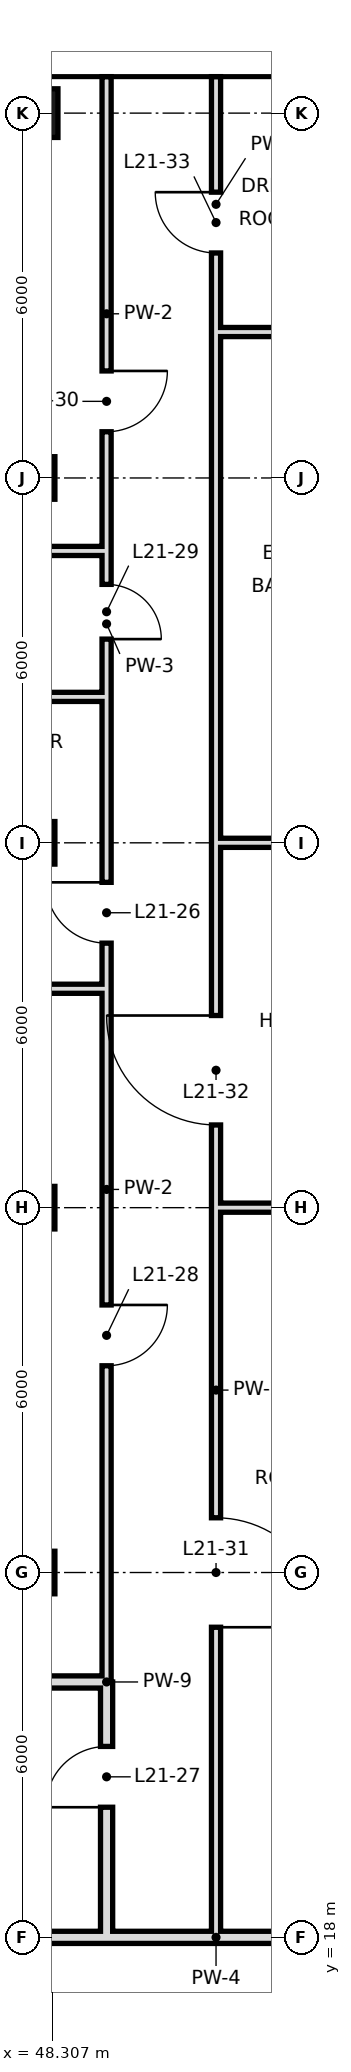
"""IFC4 building model, lengths in metres.
Left out: names, types, materials, properties, quantities, classifications, styles, units other than length and angle.
Written with IfcOpenShell. Run it as: python <this file> out.ifc"""

import sys

from ifc_helpers import new_model, si_unit, direction, frame, frame_2d, origin, origin_2d, place, context, subcontext, project, spatial, rectangle, hollow_rectangle, extrude, element, fill, save


model = new_model("IFC4")
c1 = context("Model", 3, precision=1e-05, world=origin(), true_north=direction((0.0, 1.0)))
c2 = subcontext(c1, "Body", "Model", "MODEL_VIEW")
j1 = project(units=[si_unit("LENGTHUNIT", "METRE"), si_unit("PLANEANGLEUNIT", "RADIAN")], contexts=[c1])
p1 = place(None, origin())
s1 = spatial("IfcSite", under=j1, at=p1, CompositionType="ELEMENT")
p2 = place(p1, origin())
s2 = spatial("IfcBuilding", under=s1, at=p2, CompositionType="ELEMENT")
p3 = place(p2, frame((0.0, 0.0, 99.8)))
s3 = spatial("IfcBuildingStorey", under=s2, at=p3, CompositionType="ELEMENT", Elevation=99.8)
for number, where, z_axis, x_axis in (
    (1, (48.0, 24.0, 0.0), (0.0, 0.0, 1.0), (1.0, 0.0, 0.0)),
    (2, (48.0, 30.0, 0.0), (0.0, 0.0, 1.0), (1.0, 0.0, 0.0)),
    (3, (48.0, 36.0, 0.0), (0.0, 0.0, 1.0), (1.0, 0.0, 0.0)),
    (4, (48.0, 42.0, 0.0), (0.0, 0.0, 1.0), (1.0, 0.0, 0.0)),
):
    element("IfcColumn", number, at=place(p3, frame(where, z_axis=z_axis, x_axis=x_axis)), inside=s3, PredefinedType="COLUMN", context=c2, shape_type="SweptSolid", body=[
        extrude(hollow_rectangle(XDim=0.7, YDim=0.7, WallThickness=0.036, at=origin_2d()), origin(), (0.0, 0.0, 1.0), 3.6),
    ])
p4 = place(p3, frame((48.0, 48.0, 0.0), z_axis=(0.0, 0.0, 1.0), x_axis=(1.0, 0.0, 0.0)))
e5 = element("IfcColumn", 5, at=p4, inside=s3, PredefinedType="COLUMN", context=c2, shape_type="SweptSolid", body=[
    extrude(hollow_rectangle(XDim=0.8, YDim=0.8, WallThickness=0.04, at=origin_2d()), origin(), (0.0, 0.0, 1.0), 3.6),
])
p5 = place(p3, frame((49.2, 18.0, 0.0), z_axis=(0.0, 0.0, 1.0), x_axis=(0.0, 1.0, 0.0)))
e6 = element("IfcWall", 6, at=p5, inside=s3, PredefinedType="SOLIDWALL", context=c2, shape_type="SweptSolid", body=[
    extrude(rectangle(XDim=4.2, YDim=0.2, at=frame_2d((2.1, 0.0))), origin(), (0.0, 0.0, 1.0), 2.72),
])
p6 = place(p5, frame((2.14, 0.0, 0.0)))
e7 = element("IfcOpeningElement", 7, at=p6, cuts=e6, PredefinedType="OPENING", context=c2, shape_type="SweptSolid", body=[
    extrude(rectangle(XDim=1.0, YDim=2.4, at=frame_2d((0.5, 1.2))), frame((0.0, 0.11, 0.0), z_axis=(0.0, -1.0, 0.0), x_axis=(1.0, 0.0, 0.0)), (0.0, 0.0, 1.0), 0.22),
])
p7 = place(p3, frame((49.2, 22.2, 0.0), z_axis=(0.0, 0.0, 1.0), x_axis=(0.0, 1.0, 0.0)))
e8 = element("IfcWall", 8, at=p7, inside=s3, PredefinedType="PARTITIONING", context=c2, shape_type="SweptSolid", body=[
    extrude(rectangle(XDim=16.2, YDim=0.15, at=frame_2d((8.1, 0.0))), origin(), (0.0, 0.0, 1.0), 3.42),
])
p8 = place(p7, frame((12.15, 0.0, 0.0)))
e9 = element("IfcOpeningElement", 9, at=p8, cuts=e8, PredefinedType="OPENING", context=c2, shape_type="SweptSolid", body=[
    extrude(rectangle(XDim=1.0, YDim=2.4, at=frame_2d((0.5, 1.2))), frame((0.0, 0.085, 0.0), z_axis=(0.0, -1.0, 0.0), x_axis=(1.0, 0.0, 0.0)), (0.0, 0.0, 1.0), 0.17),
])
p9 = place(p7, frame((5.2, 0.0, 0.0)))
e10 = element("IfcOpeningElement", 10, at=p9, cuts=e8, PredefinedType="OPENING", context=c2, shape_type="SweptSolid", body=[
    extrude(rectangle(XDim=1.0, YDim=2.4, at=frame_2d((0.5, 1.2))), frame((0.0, 0.085, 0.0), z_axis=(0.0, -1.0, 0.0), x_axis=(1.0, 0.0, 0.0)), (0.0, 0.0, 1.0), 0.17),
])
p10 = place(p3, frame((49.2, 40.8, 0.0), z_axis=(0.0, 0.0, 1.0), x_axis=(0.0, 1.0, 0.0)))
e11 = element("IfcWall", 11, at=p10, inside=s3, PredefinedType="PARTITIONING", context=c2, shape_type="SweptSolid", body=[
    extrude(rectangle(XDim=7.8, YDim=0.15, at=frame_2d((3.9, 0.0))), origin(), (0.0, 0.0, 1.0), 3.42),
])
p11 = place(p10, frame((1.96, 0.0, 0.0)))
e12 = element("IfcOpeningElement", 12, at=p11, cuts=e11, PredefinedType="OPENING", context=c2, shape_type="SweptSolid", body=[
    extrude(rectangle(XDim=1.0, YDim=2.4, at=frame_2d((0.5, 1.2))), frame((0.0, 0.085, 0.0), z_axis=(0.0, -1.0, 0.0), x_axis=(1.0, 0.0, 0.0)), (0.0, 0.0, 1.0), 0.17),
])
p12 = place(p3, frame((49.2, 38.4, 0.0), z_axis=(0.0, 0.0, 1.0), x_axis=(0.0, 1.0, 0.0)))
e13 = element("IfcWall", 13, at=p12, inside=s3, PredefinedType="PARTITIONING", context=c2, shape_type="SweptSolid", body=[
    extrude(rectangle(XDim=2.4, YDim=0.15, at=frame_2d((1.2, 0.0))), origin(), (0.0, 0.0, 1.0), 3.42),
])
p13 = place(p12, frame((0.95, 0.0, 0.0)))
e14 = element("IfcOpeningElement", 14, at=p13, cuts=e13, PredefinedType="OPENING", context=c2, shape_type="SweptSolid", body=[
    extrude(rectangle(XDim=0.9, YDim=2.4, at=frame_2d((0.45, 1.2))), frame((0.0, 0.085, 0.0), z_axis=(0.0, -1.0, 0.0), x_axis=(1.0, 0.0, 0.0)), (0.0, 0.0, 1.0), 0.17),
])
p14 = place(p3, frame((51.0, 18.0, 0.0), z_axis=(0.0, 0.0, 1.0), x_axis=(0.0, 1.0, 0.0)))
e15 = element("IfcWall", 15, at=p14, inside=s3, PredefinedType="PARTITIONING", context=c2, shape_type="SweptSolid", body=[
    extrude(rectangle(XDim=18.0, YDim=0.15, at=frame_2d((9.0, 0.0))), origin(), (0.0, 0.0, 1.0), 3.42),
])
p15 = place(p14, frame((5.1, 0.0, 0.0)))
e16 = element("IfcOpeningElement", 16, at=p15, cuts=e15, PredefinedType="OPENING", context=c2, shape_type="SweptSolid", body=[
    extrude(rectangle(XDim=1.8, YDim=2.4, at=frame_2d((0.9, 1.2))), frame((0.0, 0.085, 0.0), z_axis=(0.0, -1.0, 0.0), x_axis=(1.0, 0.0, 0.0)), (0.0, 0.0, 1.0), 0.17),
])
p16 = place(p14, frame((13.36, 0.0, 0.0)))
e17 = element("IfcOpeningElement", 17, at=p16, cuts=e15, PredefinedType="OPENING", context=c2, shape_type="SweptSolid", body=[
    extrude(rectangle(XDim=1.8, YDim=2.4, at=frame_2d((0.9, 1.2))), frame((0.0, 0.085, 0.0), z_axis=(0.0, -1.0, 0.0), x_axis=(1.0, 0.0, 0.0)), (0.0, 0.0, 1.0), 0.17),
])
p17 = place(p3, frame((51.0, 44.4, 0.0), z_axis=(0.0, 0.0, 1.0), x_axis=(0.0, 1.0, 0.0)))
e18 = element("IfcWall", 18, at=p17, inside=s3, PredefinedType="PARTITIONING", context=c2, shape_type="SweptSolid", body=[
    extrude(rectangle(XDim=4.2, YDim=0.15, at=frame_2d((2.1, 0.0))), origin(), (0.0, 0.0, 1.0), 3.42),
])
p18 = place(p17, frame((1.3, 0.0, 0.0)))
e19 = element("IfcOpeningElement", 19, at=p18, cuts=e18, PredefinedType="OPENING", context=c2, shape_type="SweptSolid", body=[
    extrude(rectangle(XDim=1.0, YDim=2.4, at=frame_2d((0.5, 1.2))), frame((0.0, 0.085, 0.0), z_axis=(0.0, -1.0, 0.0), x_axis=(1.0, 0.0, 0.0)), (0.0, 0.0, 1.0), 0.17),
])
p19 = place(p3, frame((51.0, 36.0, 0.0), z_axis=(0.0, 0.0, 1.0), x_axis=(0.0, 1.0, 0.0)))
e20 = element("IfcWall", 20, at=p19, inside=s3, PredefinedType="PARTITIONING", context=c2, shape_type="SweptSolid", body=[
    extrude(rectangle(XDim=8.4, YDim=0.15, at=frame_2d((4.2, 0.0))), origin(), (0.0, 0.0, 1.0), 3.42),
])
p20 = place(p3, frame((44.9, 18.0, 0.0), z_axis=(0.0, 0.0, 1.0), x_axis=(1.0, 0.0, 0.0)))
e21 = element("IfcWall", 21, at=p20, inside=s3, PredefinedType="SOLIDWALL", context=c2, shape_type="SweptSolid", body=[
    extrude(rectangle(XDim=4.3, YDim=0.2, at=frame_2d((2.15, 0.0))), origin(), (0.0, 0.0, 1.0), 2.72),
])
p21 = place(p3, frame((49.2, 18.0, 0.0), z_axis=(0.0, 0.0, 1.0), x_axis=(1.0, 0.0, 0.0)))
e22 = element("IfcWall", 22, at=p21, inside=s3, PredefinedType="SOLIDWALL", context=c2, shape_type="SweptSolid", body=[
    extrude(rectangle(XDim=3.6, YDim=0.2, at=frame_2d((1.8, 0.0))), origin(), (0.0, 0.0, 1.0), 2.72),
])
p22 = place(p3, frame((44.9, 22.2, 0.0), z_axis=(0.0, 0.0, 1.0), x_axis=(1.0, 0.0, 0.0)))
e23 = element("IfcWall", 23, at=p22, inside=s3, PredefinedType="SOLIDWALL", context=c2, shape_type="SweptSolid", body=[
    extrude(rectangle(XDim=4.3, YDim=0.2, at=frame_2d((2.15, 0.0))), origin(), (0.0, 0.0, 1.0), 2.72),
])
p23 = place(p3, frame((51.0, 30.0, 0.0), z_axis=(0.0, 0.0, 1.0), x_axis=(1.0, 0.0, 0.0)))
e24 = element("IfcWall", 24, at=p23, inside=s3, PredefinedType="PARTITIONING", context=c2, shape_type="SweptSolid", body=[
    extrude(rectangle(XDim=9.6, YDim=0.15, at=frame_2d((4.8, 0.0))), origin(), (0.0, 0.0, 1.0), 2.72),
])
p24 = place(p3, frame((44.9, 33.6, 0.0), z_axis=(0.0, 0.0, 1.0), x_axis=(1.0, 0.0, 0.0)))
e25 = element("IfcWall", 25, at=p24, inside=s3, PredefinedType="PARTITIONING", context=c2, shape_type="SweptSolid", body=[
    extrude(rectangle(XDim=4.3, YDim=0.15, at=frame_2d((2.15, 0.0))), origin(), (0.0, 0.0, 1.0), 3.42),
])
p25 = place(p3, frame((51.0, 36.0, 0.0), z_axis=(0.0, 0.0, 1.0), x_axis=(1.0, 0.0, 0.0)))
e26 = element("IfcWall", 26, at=p25, inside=s3, PredefinedType="PARTITIONING", context=c2, shape_type="SweptSolid", body=[
    extrude(rectangle(XDim=3.0, YDim=0.15, at=frame_2d((1.5, 0.0))), origin(), (0.0, 0.0, 1.0), 2.72),
])
for number, where, z_axis, x_axis in (
    (27, (44.9, 38.4, 0.0), (0.0, 0.0, 1.0), (1.0, 0.0, 0.0)),
    (28, (44.9, 40.8, 0.0), (0.0, 0.0, 1.0), (1.0, 0.0, 0.0)),
):
    element("IfcWall", number, at=place(p3, frame(where, z_axis=z_axis, x_axis=x_axis)), inside=s3, PredefinedType="PARTITIONING", context=c2, shape_type="SweptSolid", body=[
        extrude(rectangle(XDim=4.3, YDim=0.15, at=frame_2d((2.15, 0.0))), origin(), (0.0, 0.0, 1.0), 3.42),
    ])
p26 = place(p3, frame((51.0, 44.4, 0.0), z_axis=(0.0, 0.0, 1.0), x_axis=(1.0, 0.0, 0.0)))
e29 = element("IfcWall", 29, at=p26, inside=s3, PredefinedType="PARTITIONING", context=c2, shape_type="SweptSolid", body=[
    extrude(rectangle(XDim=3.0, YDim=0.15, at=frame_2d((1.5, 0.0))), origin(), (0.0, 0.0, 1.0), 3.42),
])
p27 = place(p8, frame((1.0, 0.0, 0.0), z_axis=(0.0, 0.0, 1.0), x_axis=(-1.0, 0.0, 0.0)))
e30 = element("IfcDoor", 30, at=p27, inside=s3, OperationType="SINGLE_SWING_LEFT", PredefinedType="DOOR", context=c2, shape_type="SweptSolid", body=[
    extrude(rectangle(XDim=1.0, YDim=2.4, at=frame_2d((0.5, 1.2))), frame((0.0, 0.025, 0.0), z_axis=(0.0, -1.0, 0.0), x_axis=(1.0, 0.0, 0.0)), (0.0, 0.0, 1.0), 0.05),
])
fill(e9, e30)
p28 = place(p6, origin())
e31 = element("IfcDoor", 31, at=p28, inside=s3, OperationType="SINGLE_SWING_LEFT", PredefinedType="DOOR", context=c2, shape_type="SweptSolid", body=[
    extrude(rectangle(XDim=1.0, YDim=2.4, at=frame_2d((0.5, 1.2))), frame((0.0, 0.025, 0.0), z_axis=(0.0, -1.0, 0.0), x_axis=(1.0, 0.0, 0.0)), (0.0, 0.0, 1.0), 0.05),
])
fill(e7, e31)
p29 = place(p9, origin())
e32 = element("IfcDoor", 32, at=p29, inside=s3, OperationType="SINGLE_SWING_RIGHT", PredefinedType="DOOR", context=c2, shape_type="SweptSolid", body=[
    extrude(rectangle(XDim=1.0, YDim=2.4, at=frame_2d((0.5, 1.2))), frame((0.0, 0.025, 0.0), z_axis=(0.0, -1.0, 0.0), x_axis=(1.0, 0.0, 0.0)), (0.0, 0.0, 1.0), 0.05),
])
fill(e10, e32)
p30 = place(p13, frame((0.9, 0.0, 0.0), z_axis=(0.0, 0.0, 1.0), x_axis=(-1.0, 0.0, 0.0)))
e33 = element("IfcDoor", 33, at=p30, inside=s3, OperationType="SINGLE_SWING_RIGHT", PredefinedType="DOOR", context=c2, shape_type="SweptSolid", body=[
    extrude(rectangle(XDim=0.9, YDim=2.4, at=frame_2d((0.45, 1.2))), frame((0.0, 0.025, 0.0), z_axis=(0.0, -1.0, 0.0), x_axis=(1.0, 0.0, 0.0)), (0.0, 0.0, 1.0), 0.05),
])
fill(e14, e33)
p31 = place(p11, origin())
e34 = element("IfcDoor", 34, at=p31, inside=s3, OperationType="SINGLE_SWING_RIGHT", PredefinedType="DOOR", context=c2, shape_type="SweptSolid", body=[
    extrude(rectangle(XDim=1.0, YDim=2.4, at=frame_2d((0.5, 1.2))), frame((0.0, 0.025, 0.0), z_axis=(0.0, -1.0, 0.0), x_axis=(1.0, 0.0, 0.0)), (0.0, 0.0, 1.0), 0.05),
])
fill(e12, e34)
p32 = place(p15, frame((1.8, 0.0, 0.0), z_axis=(0.0, 0.0, 1.0), x_axis=(-1.0, 0.0, 0.0)))
e35 = element("IfcDoor", 35, at=p32, inside=s3, OperationType="SINGLE_SWING_RIGHT", PredefinedType="DOOR", context=c2, shape_type="SweptSolid", body=[
    extrude(rectangle(XDim=1.8, YDim=2.4, at=frame_2d((0.9, 1.2))), frame((0.0, 0.025, 0.0), z_axis=(0.0, -1.0, 0.0), x_axis=(1.0, 0.0, 0.0)), (0.0, 0.0, 1.0), 0.05),
])
fill(e16, e35)
p33 = place(p16, frame((1.8, 0.0, 0.0), z_axis=(0.0, 0.0, 1.0), x_axis=(-1.0, 0.0, 0.0)))
e36 = element("IfcDoor", 36, at=p33, inside=s3, OperationType="SINGLE_SWING_LEFT", PredefinedType="DOOR", context=c2, shape_type="SweptSolid", body=[
    extrude(rectangle(XDim=1.8, YDim=2.4, at=frame_2d((0.9, 1.2))), frame((0.0, 0.025, 0.0), z_axis=(0.0, -1.0, 0.0), x_axis=(1.0, 0.0, 0.0)), (0.0, 0.0, 1.0), 0.05),
])
fill(e17, e36)
p34 = place(p18, frame((1.0, 0.0, 0.0), z_axis=(0.0, 0.0, 1.0), x_axis=(-1.0, 0.0, 0.0)))
e37 = element("IfcDoor", 37, at=p34, inside=s3, OperationType="SINGLE_SWING_LEFT", PredefinedType="DOOR", context=c2, shape_type="SweptSolid", body=[
    extrude(rectangle(XDim=1.0, YDim=2.4, at=frame_2d((0.5, 1.2))), frame((0.0, 0.025, 0.0), z_axis=(0.0, -1.0, 0.0), x_axis=(1.0, 0.0, 0.0)), (0.0, 0.0, 1.0), 0.05),
])
fill(e19, e37)
save(model, sys.argv[1])
